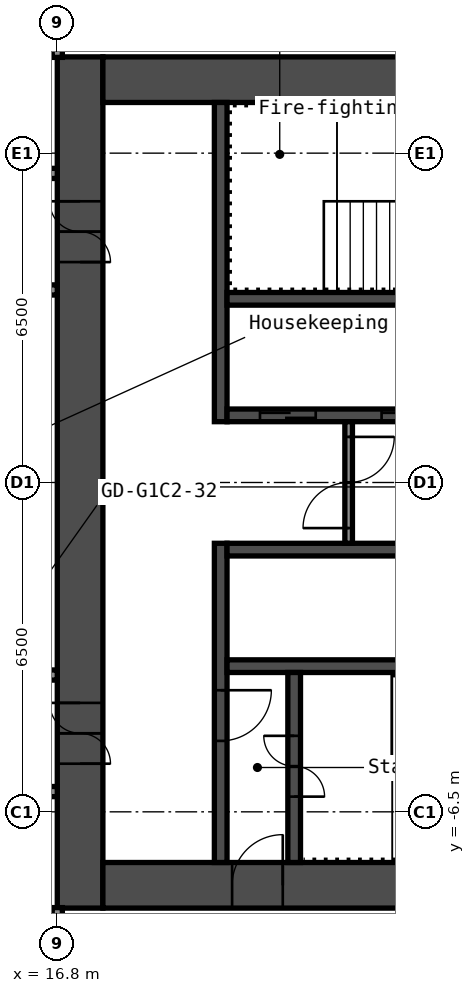
"""IFC4 building model, lengths in metres.
Left out: names, types, materials, properties, quantities, classifications, styles, units other than length and angle.
Written with IfcOpenShell. Run it as: python <this file> out.ifc"""

import sys

from ifc_helpers import new_model, si_unit, direction, frame, frame_2d, origin, place, context, subcontext, project, spatial, rectangle, extrude, element, fill, save


model = new_model("IFC4")
c1 = context("Model", 3, precision=1e-05, world=origin(), true_north=direction((0.0, 1.0)))
c2 = subcontext(c1, "Body", "Model", "MODEL_VIEW")
j1 = project(units=[si_unit("LENGTHUNIT", "METRE"), si_unit("PLANEANGLEUNIT", "RADIAN")], contexts=[c1])
p1 = place(None, origin())
s1 = spatial("IfcSite", under=j1, at=p1, CompositionType="ELEMENT")
p2 = place(p1, origin())
s2 = spatial("IfcBuilding", under=s1, at=p2, CompositionType="ELEMENT")
p3 = place(p2, frame((0.0, 0.0, 58.2)))
s3 = spatial("IfcBuildingStorey", under=s2, at=p3, CompositionType="ELEMENT", Elevation=58.2)
p4 = place(p3, frame((17.25, -8.4, 0.0), z_axis=(0.0, 0.0, 1.0), x_axis=(0.0, 1.0, 0.0)))
e1 = element("IfcWall", 1, at=p4, inside=s3, PredefinedType="SHEAR", context=c2, shape_type="SweptSolid", body=[
    extrude(rectangle(XDim=16.8, YDim=0.9, at=frame_2d((8.4, 0.0))), origin(), (0.0, 0.0, 1.0), 2.8),
])
p5 = place(p4, frame((12.75, 0.0, 0.0)))
e2 = element("IfcOpeningElement", 2, at=p5, cuts=e1, PredefinedType="OPENING", context=c2, shape_type="SweptSolid", body=[
    extrude(rectangle(XDim=1.2, YDim=2.1, at=frame_2d((0.6, 1.05))), frame((0.0, 0.46, 0.0), z_axis=(0.0, -1.0, 0.0), x_axis=(1.0, 0.0, 0.0)), (0.0, 0.0, 1.0), 0.92),
])
p6 = place(p4, frame((2.85, 0.0, 0.0)))
e3 = element("IfcOpeningElement", 3, at=p6, cuts=e1, PredefinedType="OPENING", context=c2, shape_type="SweptSolid", body=[
    extrude(rectangle(XDim=1.2, YDim=2.1, at=frame_2d((0.6, 1.05))), frame((0.0, 0.46, 0.0), z_axis=(0.0, -1.0, 0.0), x_axis=(1.0, 0.0, 0.0)), (0.0, 0.0, 1.0), 0.92),
])
p7 = place(p3, frame((17.7, 7.95, 0.0), z_axis=(0.0, 0.0, 1.0), x_axis=(1.0, 0.0, 0.0)))
e4 = element("IfcWall", 4, at=p7, inside=s3, PredefinedType="SHEAR", context=c2, shape_type="SweptSolid", body=[
    extrude(rectangle(XDim=15.0, YDim=0.9, at=frame_2d((7.5, 0.0))), origin(), (0.0, 0.0, 1.0), 2.8),
])
p8 = place(p7, frame((10.4, 0.0, 0.0)))
e5 = element("IfcOpeningElement", 5, at=p8, cuts=e4, PredefinedType="OPENING", context=c2, shape_type="SweptSolid", body=[
    extrude(rectangle(XDim=1.2, YDim=2.1, at=frame_2d((0.6, 1.05))), frame((0.0, 0.46, 0.0), z_axis=(0.0, -1.0, 0.0), x_axis=(1.0, 0.0, 0.0)), (0.0, 0.0, 1.0), 0.92),
])
p9 = place(p7, frame((13.35, 0.0, 0.0)))
e6 = element("IfcOpeningElement", 6, at=p9, cuts=e4, PredefinedType="OPENING", context=c2, shape_type="SweptSolid", body=[
    extrude(rectangle(XDim=0.9, YDim=2.1, at=frame_2d((0.45, 1.05))), frame((0.0, 0.46, 0.0), z_axis=(0.0, -1.0, 0.0), x_axis=(1.0, 0.0, 0.0)), (0.0, 0.0, 1.0), 0.92),
])
p10 = place(p3, frame((17.7, -7.95, 0.0), z_axis=(0.0, 0.0, 1.0), x_axis=(1.0, 0.0, 0.0)))
e7 = element("IfcWall", 7, at=p10, inside=s3, PredefinedType="SHEAR", context=c2, shape_type="SweptSolid", body=[
    extrude(rectangle(XDim=15.0, YDim=0.9, at=frame_2d((7.5, 0.0))), origin(), (0.0, 0.0, 1.0), 2.8),
])
p11 = place(p10, frame((2.55, 0.0, 0.0)))
e8 = element("IfcOpeningElement", 8, at=p11, cuts=e7, PredefinedType="OPENING", context=c2, shape_type="SweptSolid", body=[
    extrude(rectangle(XDim=1.0, YDim=2.1, at=frame_2d((0.5, 1.05))), frame((0.0, 0.46, 0.0), z_axis=(0.0, -1.0, 0.0), x_axis=(1.0, 0.0, 0.0)), (0.0, 0.0, 1.0), 0.92),
])
p12 = place(p3, frame((20.025, 1.2, 0.0), z_axis=(0.0, 0.0, 1.0), x_axis=(0.0, 1.0, 0.0)))
e9 = element("IfcWall", 9, at=p12, inside=s3, PredefinedType="SHEAR", context=c2, shape_type="SweptSolid", body=[
    extrude(rectangle(XDim=6.3, YDim=0.25, at=frame_2d((3.15, 0.0))), origin(), (0.0, 0.0, 1.0), 2.8),
])
p13 = place(p3, frame((20.025, -7.5, 0.0), z_axis=(0.0, 0.0, 1.0), x_axis=(0.0, 1.0, 0.0)))
e10 = element("IfcWall", 10, at=p13, inside=s3, PredefinedType="SHEAR", context=c2, shape_type="SweptSolid", body=[
    extrude(rectangle(XDim=6.3, YDim=0.25, at=frame_2d((3.15, 0.0))), origin(), (0.0, 0.0, 1.0), 2.8),
])
p14 = place(p13, frame((2.4, 0.0, 0.0)))
e11 = element("IfcOpeningElement", 11, at=p14, cuts=e10, PredefinedType="OPENING", context=c2, shape_type="SweptSolid", body=[
    extrude(rectangle(XDim=1.0, YDim=2.1, at=frame_2d((0.5, 1.05))), frame((0.0, 0.135, 0.0), z_axis=(0.0, -1.0, 0.0), x_axis=(1.0, 0.0, 0.0)), (0.0, 0.0, 1.0), 0.27),
])
p15 = place(p3, frame((20.15, 1.325, 0.0), z_axis=(0.0, 0.0, 1.0), x_axis=(1.0, 0.0, 0.0)))
e12 = element("IfcWall", 12, at=p15, inside=s3, PredefinedType="SHEAR", context=c2, shape_type="SweptSolid", body=[
    extrude(rectangle(XDim=7.5, YDim=0.25, at=frame_2d((3.75, 0.0))), origin(), (0.0, 0.0, 1.0), 2.8),
])
p16 = place(p15, frame((0.65, 0.0, 0.0)))
e13 = element("IfcOpeningElement", 13, at=p16, cuts=e12, PredefinedType="OPENING", context=c2, shape_type="SweptSolid", body=[
    extrude(rectangle(XDim=1.1, YDim=2.1, at=frame_2d((0.55, 1.05))), frame((0.0, 0.135, 0.0), z_axis=(0.0, -1.0, 0.0), x_axis=(1.0, 0.0, 0.0)), (0.0, 0.0, 1.0), 0.27),
])
p17 = place(p15, frame((3.05, 0.0, 0.0)))
e14 = element("IfcOpeningElement", 14, at=p17, cuts=e12, PredefinedType="OPENING", context=c2, shape_type="SweptSolid", body=[
    extrude(rectangle(XDim=1.1, YDim=2.1, at=frame_2d((0.55, 1.05))), frame((0.0, 0.135, 0.0), z_axis=(0.0, -1.0, 0.0), x_axis=(1.0, 0.0, 0.0)), (0.0, 0.0, 1.0), 0.27),
])
p18 = place(p15, frame((5.45, 0.0, 0.0)))
e15 = element("IfcOpeningElement", 15, at=p18, cuts=e12, PredefinedType="OPENING", context=c2, shape_type="SweptSolid", body=[
    extrude(rectangle(XDim=1.1, YDim=2.1, at=frame_2d((0.55, 1.05))), frame((0.0, 0.135, 0.0), z_axis=(0.0, -1.0, 0.0), x_axis=(1.0, 0.0, 0.0)), (0.0, 0.0, 1.0), 0.27),
])
for number, where, z_axis, x_axis in (
    (16, (20.15, 3.625, 0.0), (0.0, 0.0, 1.0), (1.0, 0.0, 0.0)),
    (17, (20.15, -1.325, 0.0), (0.0, 0.0, 1.0), (1.0, 0.0, 0.0)),
    (18, (20.15, -3.625, 0.0), (0.0, 0.0, 1.0), (1.0, 0.0, 0.0)),
):
    element("IfcWall", number, at=place(p3, frame(where, z_axis=z_axis, x_axis=x_axis)), inside=s3, PredefinedType="SHEAR", context=c2, shape_type="SweptSolid", body=[
        extrude(rectangle(XDim=7.5, YDim=0.25, at=frame_2d((3.75, 0.0))), origin(), (0.0, 0.0, 1.0), 2.8),
    ])
p19 = place(p3, frame((21.475, -7.5, 0.0), z_axis=(0.0, 0.0, 1.0), x_axis=(0.0, 1.0, 0.0)))
e19 = element("IfcWall", 19, at=p19, inside=s3, PredefinedType="SHEAR", context=c2, shape_type="SweptSolid", body=[
    extrude(rectangle(XDim=3.75, YDim=0.25, at=frame_2d((1.875, 0.0))), origin(), (0.0, 0.0, 1.0), 2.8),
])
p20 = place(p19, frame((1.3, 0.0, 0.0)))
e20 = element("IfcOpeningElement", 20, at=p20, cuts=e19, PredefinedType="OPENING", context=c2, shape_type="SweptSolid", body=[
    extrude(rectangle(XDim=1.2, YDim=2.1, at=frame_2d((0.6, 1.05))), frame((0.0, 0.135, 0.0), z_axis=(0.0, -1.0, 0.0), x_axis=(1.0, 0.0, 0.0)), (0.0, 0.0, 1.0), 0.27),
])
p21 = place(p3, frame((22.55, -1.2, 0.0), z_axis=(0.0, 0.0, 1.0), x_axis=(0.0, 1.0, 0.0)))
e21 = element("IfcWall", 21, at=p21, inside=s3, PredefinedType="PARTITIONING", context=c2, shape_type="SweptSolid", body=[
    extrude(rectangle(XDim=2.4, YDim=0.15, at=frame_2d((1.2, 0.0))), origin(), (0.0, 0.0, 1.0), 2.8),
])
p22 = place(p21, frame((0.3, 0.0, 0.0)))
e22 = element("IfcOpeningElement", 22, at=p22, cuts=e21, PredefinedType="OPENING", context=c2, shape_type="SweptSolid", body=[
    extrude(rectangle(XDim=1.8, YDim=2.1, at=frame_2d((0.9, 1.05))), frame((0.0, 0.085, 0.0), z_axis=(0.0, -1.0, 0.0), x_axis=(1.0, 0.0, 0.0)), (0.0, 0.0, 1.0), 0.17),
])
p23 = place(p3, frame((-16.8, -6.1, 0.0), z_axis=(0.0, 0.0, 1.0), x_axis=(1.0, 0.0, 0.0)))
e23 = element("IfcWall", 23, at=p23, inside=s3, PredefinedType="PARTITIONING", context=c2, shape_type="SweptSolid", body=[
    extrude(rectangle(XDim=33.6, YDim=0.2, at=frame_2d((16.8, 0.0))), origin(), (0.0, 0.0, 1.0), 2.8),
])
p24 = place(p23, frame((2.0, 0.0, 0.0)))
e24 = element("IfcOpeningElement", 24, at=p24, cuts=e23, PredefinedType="OPENING", context=c2, shape_type="SweptSolid", body=[
    extrude(rectangle(XDim=1.0, YDim=2.1, at=frame_2d((0.5, 1.05))), frame((0.0, 0.11, 0.0), z_axis=(0.0, -1.0, 0.0), x_axis=(1.0, 0.0, 0.0)), (0.0, 0.0, 1.0), 0.22),
])
p25 = place(p23, frame((11.25, 0.0, 0.0)))
e25 = element("IfcOpeningElement", 25, at=p25, cuts=e23, PredefinedType="OPENING", context=c2, shape_type="SweptSolid", body=[
    extrude(rectangle(XDim=1.0, YDim=2.1, at=frame_2d((0.5, 1.05))), frame((0.0, 0.11, 0.0), z_axis=(0.0, -1.0, 0.0), x_axis=(1.0, 0.0, 0.0)), (0.0, 0.0, 1.0), 0.22),
])
p26 = place(p23, frame((12.95, 0.0, 0.0)))
e26 = element("IfcOpeningElement", 26, at=p26, cuts=e23, PredefinedType="OPENING", context=c2, shape_type="SweptSolid", body=[
    extrude(rectangle(XDim=1.0, YDim=2.1, at=frame_2d((0.5, 1.05))), frame((0.0, 0.11, 0.0), z_axis=(0.0, -1.0, 0.0), x_axis=(1.0, 0.0, 0.0)), (0.0, 0.0, 1.0), 0.22),
])
p27 = place(p23, frame((20.5, 0.0, 0.0)))
e27 = element("IfcOpeningElement", 27, at=p27, cuts=e23, PredefinedType="OPENING", context=c2, shape_type="SweptSolid", body=[
    extrude(rectangle(XDim=1.0, YDim=2.1, at=frame_2d((0.5, 1.05))), frame((0.0, 0.11, 0.0), z_axis=(0.0, -1.0, 0.0), x_axis=(1.0, 0.0, 0.0)), (0.0, 0.0, 1.0), 0.22),
])
p28 = place(p23, frame((28.05, 0.0, 0.0)))
e28 = element("IfcOpeningElement", 28, at=p28, cuts=e23, PredefinedType="OPENING", context=c2, shape_type="SweptSolid", body=[
    extrude(rectangle(XDim=1.0, YDim=2.1, at=frame_2d((0.5, 1.05))), frame((0.0, 0.11, 0.0), z_axis=(0.0, -1.0, 0.0), x_axis=(1.0, 0.0, 0.0)), (0.0, 0.0, 1.0), 0.22),
])
p29 = place(p23, frame((29.75, 0.0, 0.0)))
e29 = element("IfcOpeningElement", 29, at=p29, cuts=e23, PredefinedType="OPENING", context=c2, shape_type="SweptSolid", body=[
    extrude(rectangle(XDim=1.0, YDim=2.1, at=frame_2d((0.5, 1.05))), frame((0.0, 0.11, 0.0), z_axis=(0.0, -1.0, 0.0), x_axis=(1.0, 0.0, 0.0)), (0.0, 0.0, 1.0), 0.22),
])
p30 = place(p3, frame((-16.8, -3.8, 0.0), z_axis=(0.0, 0.0, 1.0), x_axis=(1.0, 0.0, 0.0)))
e30 = element("IfcWall", 30, at=p30, inside=s3, PredefinedType="PARTITIONING", context=c2, shape_type="SweptSolid", body=[
    extrude(rectangle(XDim=33.6, YDim=0.2, at=frame_2d((16.8, 0.0))), origin(), (0.0, 0.0, 1.0), 2.8),
])
p31 = place(p30, frame((9.63, 0.0, 0.0)))
e31 = element("IfcOpeningElement", 31, at=p31, cuts=e30, PredefinedType="OPENING", context=c2, shape_type="SweptSolid", body=[
    extrude(rectangle(XDim=0.9, YDim=2.1, at=frame_2d((0.45, 1.05))), frame((0.0, 0.11, 0.0), z_axis=(0.0, -1.0, 0.0), x_axis=(1.0, 0.0, 0.0)), (0.0, 0.0, 1.0), 0.22),
])
p32 = place(p30, frame((13.83, 0.0, 0.0)))
e32 = element("IfcOpeningElement", 32, at=p32, cuts=e30, PredefinedType="OPENING", context=c2, shape_type="SweptSolid", body=[
    extrude(rectangle(XDim=0.9, YDim=2.1, at=frame_2d((0.45, 1.05))), frame((0.0, 0.11, 0.0), z_axis=(0.0, -1.0, 0.0), x_axis=(1.0, 0.0, 0.0)), (0.0, 0.0, 1.0), 0.22),
])
p33 = place(p30, frame((27.355, 0.0, 0.0)))
e33 = element("IfcOpeningElement", 33, at=p33, cuts=e30, PredefinedType="OPENING", context=c2, shape_type="SweptSolid", body=[
    extrude(rectangle(XDim=0.9, YDim=2.1, at=frame_2d((0.45, 1.05))), frame((0.0, 0.11, 0.0), z_axis=(0.0, -1.0, 0.0), x_axis=(1.0, 0.0, 0.0)), (0.0, 0.0, 1.0), 0.22),
])
p34 = place(p30, frame((31.555, 0.0, 0.0)))
e34 = element("IfcOpeningElement", 34, at=p34, cuts=e30, PredefinedType="OPENING", context=c2, shape_type="SweptSolid", body=[
    extrude(rectangle(XDim=0.9, YDim=2.1, at=frame_2d((0.45, 1.05))), frame((0.0, 0.11, 0.0), z_axis=(0.0, -1.0, 0.0), x_axis=(1.0, 0.0, 0.0)), (0.0, 0.0, 1.0), 0.22),
])
p35 = place(p3, frame((-16.8, 3.8, 0.0), z_axis=(0.0, 0.0, 1.0), x_axis=(1.0, 0.0, 0.0)))
e35 = element("IfcWall", 35, at=p35, inside=s3, PredefinedType="PARTITIONING", context=c2, shape_type="SweptSolid", body=[
    extrude(rectangle(XDim=33.6, YDim=0.2, at=frame_2d((16.8, 0.0))), origin(), (0.0, 0.0, 1.0), 2.8),
])
p36 = place(p35, frame((1.06, 0.0, 0.0)))
e36 = element("IfcOpeningElement", 36, at=p36, cuts=e35, PredefinedType="OPENING", context=c2, shape_type="SweptSolid", body=[
    extrude(rectangle(XDim=0.9, YDim=2.1, at=frame_2d((0.45, 1.05))), frame((0.0, 0.11, 0.0), z_axis=(0.0, -1.0, 0.0), x_axis=(1.0, 0.0, 0.0)), (0.0, 0.0, 1.0), 0.22),
])
p37 = place(p35, frame((5.26, 0.0, 0.0)))
e37 = element("IfcOpeningElement", 37, at=p37, cuts=e35, PredefinedType="OPENING", context=c2, shape_type="SweptSolid", body=[
    extrude(rectangle(XDim=0.9, YDim=2.1, at=frame_2d((0.45, 1.05))), frame((0.0, 0.11, 0.0), z_axis=(0.0, -1.0, 0.0), x_axis=(1.0, 0.0, 0.0)), (0.0, 0.0, 1.0), 0.22),
])
p38 = place(p35, frame((18.87, 0.0, 0.0)))
e38 = element("IfcOpeningElement", 38, at=p38, cuts=e35, PredefinedType="OPENING", context=c2, shape_type="SweptSolid", body=[
    extrude(rectangle(XDim=0.9, YDim=2.1, at=frame_2d((0.45, 1.05))), frame((0.0, 0.11, 0.0), z_axis=(0.0, -1.0, 0.0), x_axis=(1.0, 0.0, 0.0)), (0.0, 0.0, 1.0), 0.22),
])
p39 = place(p35, frame((23.07, 0.0, 0.0)))
e39 = element("IfcOpeningElement", 39, at=p39, cuts=e35, PredefinedType="OPENING", context=c2, shape_type="SweptSolid", body=[
    extrude(rectangle(XDim=0.9, YDim=2.1, at=frame_2d((0.45, 1.05))), frame((0.0, 0.11, 0.0), z_axis=(0.0, -1.0, 0.0), x_axis=(1.0, 0.0, 0.0)), (0.0, 0.0, 1.0), 0.22),
])
p40 = place(p3, frame((-16.8, 6.1, 0.0), z_axis=(0.0, 0.0, 1.0), x_axis=(1.0, 0.0, 0.0)))
e40 = element("IfcWall", 40, at=p40, inside=s3, PredefinedType="PARTITIONING", context=c2, shape_type="SweptSolid", body=[
    extrude(rectangle(XDim=33.6, YDim=0.2, at=frame_2d((16.8, 0.0))), origin(), (0.0, 0.0, 1.0), 2.8),
])
p41 = place(p40, frame((2.0, 0.0, 0.0)))
e41 = element("IfcOpeningElement", 41, at=p41, cuts=e40, PredefinedType="OPENING", context=c2, shape_type="SweptSolid", body=[
    extrude(rectangle(XDim=1.0, YDim=2.1, at=frame_2d((0.5, 1.05))), frame((0.0, 0.11, 0.0), z_axis=(0.0, -1.0, 0.0), x_axis=(1.0, 0.0, 0.0)), (0.0, 0.0, 1.0), 0.22),
])
p42 = place(p40, frame((11.25, 0.0, 0.0)))
e42 = element("IfcOpeningElement", 42, at=p42, cuts=e40, PredefinedType="OPENING", context=c2, shape_type="SweptSolid", body=[
    extrude(rectangle(XDim=1.0, YDim=2.1, at=frame_2d((0.5, 1.05))), frame((0.0, 0.11, 0.0), z_axis=(0.0, -1.0, 0.0), x_axis=(1.0, 0.0, 0.0)), (0.0, 0.0, 1.0), 0.22),
])
p43 = place(p40, frame((12.95, 0.0, 0.0)))
e43 = element("IfcOpeningElement", 43, at=p43, cuts=e40, PredefinedType="OPENING", context=c2, shape_type="SweptSolid", body=[
    extrude(rectangle(XDim=1.0, YDim=2.1, at=frame_2d((0.5, 1.05))), frame((0.0, 0.11, 0.0), z_axis=(0.0, -1.0, 0.0), x_axis=(1.0, 0.0, 0.0)), (0.0, 0.0, 1.0), 0.22),
])
p44 = place(p40, frame((20.5, 0.0, 0.0)))
e44 = element("IfcOpeningElement", 44, at=p44, cuts=e40, PredefinedType="OPENING", context=c2, shape_type="SweptSolid", body=[
    extrude(rectangle(XDim=1.0, YDim=2.1, at=frame_2d((0.5, 1.05))), frame((0.0, 0.11, 0.0), z_axis=(0.0, -1.0, 0.0), x_axis=(1.0, 0.0, 0.0)), (0.0, 0.0, 1.0), 0.22),
])
p45 = place(p40, frame((28.05, 0.0, 0.0)))
e45 = element("IfcOpeningElement", 45, at=p45, cuts=e40, PredefinedType="OPENING", context=c2, shape_type="SweptSolid", body=[
    extrude(rectangle(XDim=1.0, YDim=2.1, at=frame_2d((0.5, 1.05))), frame((0.0, 0.11, 0.0), z_axis=(0.0, -1.0, 0.0), x_axis=(1.0, 0.0, 0.0)), (0.0, 0.0, 1.0), 0.22),
])
p46 = place(p40, frame((29.75, 0.0, 0.0)))
e46 = element("IfcOpeningElement", 46, at=p46, cuts=e40, PredefinedType="OPENING", context=c2, shape_type="SweptSolid", body=[
    extrude(rectangle(XDim=1.0, YDim=2.1, at=frame_2d((0.5, 1.05))), frame((0.0, 0.11, 0.0), z_axis=(0.0, -1.0, 0.0), x_axis=(1.0, 0.0, 0.0)), (0.0, 0.0, 1.0), 0.22),
])
for number, where, z_axis, x_axis in (
    (47, (16.8, -20.3, 0.0), (0.0, 0.0, 1.0), (0.0, 1.0, 0.0)),
    (48, (16.8, 8.39, 0.0), (0.0, 0.0, 1.0), (0.0, 1.0, 0.0)),
):
    element("IfcWall", number, at=place(p3, frame(where, z_axis=z_axis, x_axis=x_axis)), inside=s3, PredefinedType="PARTITIONING", context=c2, shape_type="SweptSolid", body=[
        extrude(rectangle(XDim=11.91, YDim=0.2, at=frame_2d((5.955, 0.0))), origin(), (0.0, 0.0, 1.0), 2.8),
    ])
p47 = place(p5, origin())
e49 = element("IfcDoor", 49, at=p47, inside=s3, OperationType="DOUBLE_DOOR_SINGLE_SWING", PredefinedType="DOOR", context=c2, shape_type="SweptSolid", body=[
    extrude(rectangle(XDim=1.2, YDim=2.1, at=frame_2d((0.6, 1.05))), frame((0.0, 0.025, 0.0), z_axis=(0.0, -1.0, 0.0), x_axis=(1.0, 0.0, 0.0)), (0.0, 0.0, 1.0), 0.05),
])
fill(e2, e49)
p48 = place(p6, origin())
e50 = element("IfcDoor", 50, at=p48, inside=s3, OperationType="DOUBLE_DOOR_SINGLE_SWING", PredefinedType="DOOR", context=c2, shape_type="SweptSolid", body=[
    extrude(rectangle(XDim=1.2, YDim=2.1, at=frame_2d((0.6, 1.05))), frame((0.0, 0.025, 0.0), z_axis=(0.0, -1.0, 0.0), x_axis=(1.0, 0.0, 0.0)), (0.0, 0.0, 1.0), 0.05),
])
fill(e3, e50)
p49 = place(p11, origin())
e51 = element("IfcDoor", 51, at=p49, inside=s3, OperationType="SINGLE_SWING_LEFT", PredefinedType="DOOR", context=c2, shape_type="SweptSolid", body=[
    extrude(rectangle(XDim=1.0, YDim=2.1, at=frame_2d((0.5, 1.05))), frame((0.0, 0.025, 0.0), z_axis=(0.0, -1.0, 0.0), x_axis=(1.0, 0.0, 0.0)), (0.0, 0.0, 1.0), 0.05),
])
fill(e8, e51)
p50 = place(p20, origin())
e52 = element("IfcDoor", 52, at=p50, inside=s3, OperationType="DOUBLE_DOOR_SINGLE_SWING", PredefinedType="DOOR", context=c2, shape_type="SweptSolid", body=[
    extrude(rectangle(XDim=1.2, YDim=2.1, at=frame_2d((0.6, 1.05))), frame((0.0, 0.025, 0.0), z_axis=(0.0, -1.0, 0.0), x_axis=(1.0, 0.0, 0.0)), (0.0, 0.0, 1.0), 0.05),
])
fill(e20, e52)
p51 = place(p14, origin())
e53 = element("IfcDoor", 53, at=p51, inside=s3, OperationType="SINGLE_SWING_RIGHT", PredefinedType="DOOR", context=c2, shape_type="SweptSolid", body=[
    extrude(rectangle(XDim=1.0, YDim=2.1, at=frame_2d((0.5, 1.05))), frame((0.0, 0.025, 0.0), z_axis=(0.0, -1.0, 0.0), x_axis=(1.0, 0.0, 0.0)), (0.0, 0.0, 1.0), 0.05),
])
fill(e11, e53)
p52 = place(p22, origin())
e54 = element("IfcDoor", 54, at=p52, inside=s3, OperationType="DOUBLE_DOOR_SINGLE_SWING", PredefinedType="DOOR", context=c2, shape_type="SweptSolid", body=[
    extrude(rectangle(XDim=1.8, YDim=2.1, at=frame_2d((0.9, 1.05))), frame((0.0, 0.025, 0.0), z_axis=(0.0, -1.0, 0.0), x_axis=(1.0, 0.0, 0.0)), (0.0, 0.0, 1.0), 0.05),
])
fill(e22, e54)
p53 = place(p16, origin())
e55 = element("IfcDoor", 55, at=p53, inside=s3, OperationType="DOUBLE_DOOR_SLIDING", PredefinedType="DOOR", context=c2, shape_type="SweptSolid", body=[
    extrude(rectangle(XDim=1.1, YDim=2.1, at=frame_2d((0.55, 1.05))), frame((0.0, 0.025, 0.0), z_axis=(0.0, -1.0, 0.0), x_axis=(1.0, 0.0, 0.0)), (0.0, 0.0, 1.0), 0.05),
])
fill(e13, e55)
p54 = place(p17, origin())
e56 = element("IfcDoor", 56, at=p54, inside=s3, OperationType="DOUBLE_DOOR_SLIDING", PredefinedType="DOOR", context=c2, shape_type="SweptSolid", body=[
    extrude(rectangle(XDim=1.1, YDim=2.1, at=frame_2d((0.55, 1.05))), frame((0.0, 0.025, 0.0), z_axis=(0.0, -1.0, 0.0), x_axis=(1.0, 0.0, 0.0)), (0.0, 0.0, 1.0), 0.05),
])
fill(e14, e56)
save(model, sys.argv[1])
